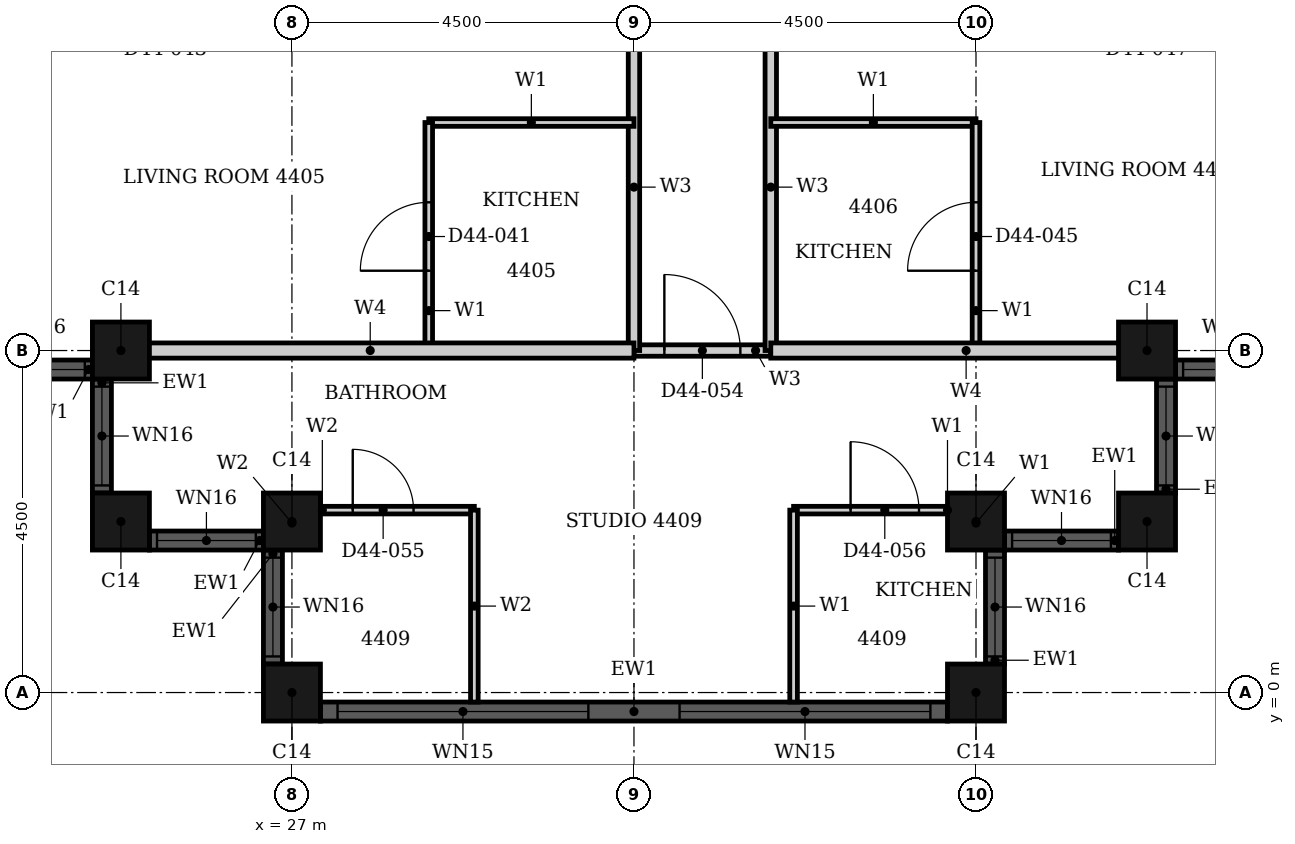
"""IFC4 building model, lengths in metres.
Left out: names, types, materials, properties, quantities, classifications, styles, units other than length and angle.
Written with IfcOpenShell. Run it as: python <this file> out.ifc"""

import sys

from ifc_helpers import new_model, si_unit, direction, frame, frame_2d, origin, origin_2d, place, context, subcontext, project, spatial, rectangle, hollow_rectangle, extrude, element, fill, save


model = new_model("IFC4")
c1 = context("Model", 3, precision=1e-05, world=origin(), true_north=direction((0.0, 1.0)))
c2 = subcontext(c1, "Body", "Model", "MODEL_VIEW")
j1 = project(units=[si_unit("LENGTHUNIT", "METRE"), si_unit("PLANEANGLEUNIT", "RADIAN")], contexts=[c1])
p1 = place(None, origin())
s1 = spatial("IfcSite", under=j1, at=p1, CompositionType="ELEMENT")
p2 = place(p1, origin())
s2 = spatial("IfcBuilding", under=s1, at=p2, CompositionType="ELEMENT")
p3 = place(p2, frame((0.0, 0.0, 176.5)))
s3 = spatial("IfcBuildingStorey", under=s2, at=p3, CompositionType="ELEMENT", Elevation=176.5)
for number, where, z_axis, x_axis in (
    (1, (24.75, 4.5, 0.0), (0.0, 0.0, 1.0), (1.0, 0.0, 0.0)),
    (2, (24.75, 2.25, 0.0), (0.0, 0.0, 1.0), (1.0, 0.0, 0.0)),
    (3, (27.0, 2.25, 0.0), (0.0, 0.0, 1.0), (1.0, 0.0, 0.0)),
    (4, (27.0, 0.0, 0.0), (0.0, 0.0, 1.0), (1.0, 0.0, 0.0)),
    (5, (36.0, 0.0, 0.0), (0.0, 0.0, 1.0), (1.0, 0.0, 0.0)),
    (6, (36.0, 2.25, 0.0), (0.0, 0.0, 1.0), (1.0, 0.0, 0.0)),
    (7, (38.25, 2.25, 0.0), (0.0, 0.0, 1.0), (1.0, 0.0, 0.0)),
    (8, (38.25, 4.5, 0.0), (0.0, 0.0, 1.0), (1.0, 0.0, 0.0)),
):
    element("IfcColumn", number, at=place(p3, frame(where, z_axis=z_axis, x_axis=x_axis)), inside=s3, PredefinedType="COLUMN", context=c2, shape_type="SweptSolid", body=[
        extrude(hollow_rectangle(XDim=0.75, YDim=0.75, WallThickness=0.024, at=origin_2d()), origin(), (0.0, 0.0, 1.0), 3.7),
    ])
p4 = place(p3, frame((22.875, 4.25, 0.0), z_axis=(0.0, 0.0, 1.0), x_axis=(1.0, 0.0, 0.0)))
e9 = element("IfcWall", 9, at=p4, inside=s3, PredefinedType="SOLIDWALL", context=c2, shape_type="SweptSolid", body=[
    extrude(rectangle(XDim=1.5, YDim=0.25, at=frame_2d((0.75, 0.0))), origin(), (0.0, 0.0, 1.0), 3.7),
])
p5 = place(p4, frame((0.1, 0.0, 0.9)))
e10 = element("IfcOpeningElement", 10, at=p5, cuts=e9, PredefinedType="OPENING", context=c2, shape_type="SweptSolid", body=[
    extrude(rectangle(XDim=1.3, YDim=1.85, at=frame_2d((0.65, 0.925))), frame((0.0, 0.135, 0.0), z_axis=(0.0, -1.0, 0.0), x_axis=(1.0, 0.0, 0.0)), (0.0, 0.0, 1.0), 0.27),
])
p6 = place(p3, frame((24.5, 4.125, 0.0), z_axis=(0.0, 0.0, 1.0), x_axis=(0.0, -1.0, 0.0)))
e11 = element("IfcWall", 11, at=p6, inside=s3, PredefinedType="SOLIDWALL", context=c2, shape_type="SweptSolid", body=[
    extrude(rectangle(XDim=1.5, YDim=0.25, at=frame_2d((0.75, 0.0))), origin(), (0.0, 0.0, 1.0), 3.7),
])
p7 = place(p6, frame((0.1, 0.0, 0.9)))
e12 = element("IfcOpeningElement", 12, at=p7, cuts=e11, PredefinedType="OPENING", context=c2, shape_type="SweptSolid", body=[
    extrude(rectangle(XDim=1.3, YDim=1.85, at=frame_2d((0.65, 0.925))), frame((0.0, 0.135, 0.0), z_axis=(0.0, -1.0, 0.0), x_axis=(1.0, 0.0, 0.0)), (0.0, 0.0, 1.0), 0.27),
])
p8 = place(p3, frame((25.125, 2.0, 0.0), z_axis=(0.0, 0.0, 1.0), x_axis=(1.0, 0.0, 0.0)))
e13 = element("IfcWall", 13, at=p8, inside=s3, PredefinedType="SOLIDWALL", context=c2, shape_type="SweptSolid", body=[
    extrude(rectangle(XDim=1.5, YDim=0.25, at=frame_2d((0.75, 0.0))), origin(), (0.0, 0.0, 1.0), 3.7),
])
p9 = place(p8, frame((0.1, 0.0, 0.9)))
e14 = element("IfcOpeningElement", 14, at=p9, cuts=e13, PredefinedType="OPENING", context=c2, shape_type="SweptSolid", body=[
    extrude(rectangle(XDim=1.3, YDim=1.85, at=frame_2d((0.65, 0.925))), frame((0.0, 0.135, 0.0), z_axis=(0.0, -1.0, 0.0), x_axis=(1.0, 0.0, 0.0)), (0.0, 0.0, 1.0), 0.27),
])
p10 = place(p3, frame((26.75, 1.875, 0.0), z_axis=(0.0, 0.0, 1.0), x_axis=(0.0, -1.0, 0.0)))
e15 = element("IfcWall", 15, at=p10, inside=s3, PredefinedType="SOLIDWALL", context=c2, shape_type="SweptSolid", body=[
    extrude(rectangle(XDim=1.5, YDim=0.25, at=frame_2d((0.75, 0.0))), origin(), (0.0, 0.0, 1.0), 3.7),
])
p11 = place(p10, frame((0.1, 0.0, 0.9)))
e16 = element("IfcOpeningElement", 16, at=p11, cuts=e15, PredefinedType="OPENING", context=c2, shape_type="SweptSolid", body=[
    extrude(rectangle(XDim=1.3, YDim=1.85, at=frame_2d((0.65, 0.925))), frame((0.0, 0.135, 0.0), z_axis=(0.0, -1.0, 0.0), x_axis=(1.0, 0.0, 0.0)), (0.0, 0.0, 1.0), 0.27),
])
p12 = place(p3, frame((27.375, -0.25, 0.0), z_axis=(0.0, 0.0, 1.0), x_axis=(1.0, 0.0, 0.0)))
e17 = element("IfcWall", 17, at=p12, inside=s3, PredefinedType="SOLIDWALL", context=c2, shape_type="SweptSolid", body=[
    extrude(rectangle(XDim=8.25, YDim=0.25, at=frame_2d((4.125, 0.0))), origin(), (0.0, 0.0, 1.0), 3.7),
])
p13 = place(p12, frame((0.225, 0.0, 0.45)))
e18 = element("IfcOpeningElement", 18, at=p13, cuts=e17, PredefinedType="OPENING", context=c2, shape_type="SweptSolid", body=[
    extrude(rectangle(XDim=3.3, YDim=2.3, at=frame_2d((1.65, 1.15))), frame((0.0, 0.135, 0.0), z_axis=(0.0, -1.0, 0.0), x_axis=(1.0, 0.0, 0.0)), (0.0, 0.0, 1.0), 0.27),
])
p14 = place(p12, frame((4.725, 0.0, 0.45)))
e19 = element("IfcOpeningElement", 19, at=p14, cuts=e17, PredefinedType="OPENING", context=c2, shape_type="SweptSolid", body=[
    extrude(rectangle(XDim=3.3, YDim=2.3, at=frame_2d((1.65, 1.15))), frame((0.0, 0.135, 0.0), z_axis=(0.0, -1.0, 0.0), x_axis=(1.0, 0.0, 0.0)), (0.0, 0.0, 1.0), 0.27),
])
p15 = place(p3, frame((36.25, 0.375, 0.0), z_axis=(0.0, 0.0, 1.0), x_axis=(0.0, 1.0, 0.0)))
e20 = element("IfcWall", 20, at=p15, inside=s3, PredefinedType="SOLIDWALL", context=c2, shape_type="SweptSolid", body=[
    extrude(rectangle(XDim=1.5, YDim=0.25, at=frame_2d((0.75, 0.0))), origin(), (0.0, 0.0, 1.0), 3.7),
])
p16 = place(p15, frame((0.1, 0.0, 0.9)))
e21 = element("IfcOpeningElement", 21, at=p16, cuts=e20, PredefinedType="OPENING", context=c2, shape_type="SweptSolid", body=[
    extrude(rectangle(XDim=1.3, YDim=1.85, at=frame_2d((0.65, 0.925))), frame((0.0, 0.135, 0.0), z_axis=(0.0, -1.0, 0.0), x_axis=(1.0, 0.0, 0.0)), (0.0, 0.0, 1.0), 0.27),
])
p17 = place(p3, frame((36.375, 2.0, 0.0), z_axis=(0.0, 0.0, 1.0), x_axis=(1.0, 0.0, 0.0)))
e22 = element("IfcWall", 22, at=p17, inside=s3, PredefinedType="SOLIDWALL", context=c2, shape_type="SweptSolid", body=[
    extrude(rectangle(XDim=1.5, YDim=0.25, at=frame_2d((0.75, 0.0))), origin(), (0.0, 0.0, 1.0), 3.7),
])
p18 = place(p17, frame((0.1, 0.0, 0.9)))
e23 = element("IfcOpeningElement", 23, at=p18, cuts=e22, PredefinedType="OPENING", context=c2, shape_type="SweptSolid", body=[
    extrude(rectangle(XDim=1.3, YDim=1.85, at=frame_2d((0.65, 0.925))), frame((0.0, 0.135, 0.0), z_axis=(0.0, -1.0, 0.0), x_axis=(1.0, 0.0, 0.0)), (0.0, 0.0, 1.0), 0.27),
])
p19 = place(p3, frame((38.5, 2.625, 0.0), z_axis=(0.0, 0.0, 1.0), x_axis=(0.0, 1.0, 0.0)))
e24 = element("IfcWall", 24, at=p19, inside=s3, PredefinedType="SOLIDWALL", context=c2, shape_type="SweptSolid", body=[
    extrude(rectangle(XDim=1.5, YDim=0.25, at=frame_2d((0.75, 0.0))), origin(), (0.0, 0.0, 1.0), 3.7),
])
p20 = place(p19, frame((0.1, 0.0, 0.9)))
e25 = element("IfcOpeningElement", 25, at=p20, cuts=e24, PredefinedType="OPENING", context=c2, shape_type="SweptSolid", body=[
    extrude(rectangle(XDim=1.3, YDim=1.85, at=frame_2d((0.65, 0.925))), frame((0.0, 0.135, 0.0), z_axis=(0.0, -1.0, 0.0), x_axis=(1.0, 0.0, 0.0)), (0.0, 0.0, 1.0), 0.27),
])
p21 = place(p3, frame((38.625, 4.25, 0.0), z_axis=(0.0, 0.0, 1.0), x_axis=(1.0, 0.0, 0.0)))
e26 = element("IfcWall", 26, at=p21, inside=s3, PredefinedType="SOLIDWALL", context=c2, shape_type="SweptSolid", body=[
    extrude(rectangle(XDim=1.5, YDim=0.25, at=frame_2d((0.75, 0.0))), origin(), (0.0, 0.0, 1.0), 3.7),
])
p22 = place(p21, frame((0.1, 0.0, 0.9)))
e27 = element("IfcOpeningElement", 27, at=p22, cuts=e26, PredefinedType="OPENING", context=c2, shape_type="SweptSolid", body=[
    extrude(rectangle(XDim=1.3, YDim=1.85, at=frame_2d((0.65, 0.925))), frame((0.0, 0.135, 0.0), z_axis=(0.0, -1.0, 0.0), x_axis=(1.0, 0.0, 0.0)), (0.0, 0.0, 1.0), 0.27),
])
p23 = place(p3, frame((31.5, 4.5, 0.0), z_axis=(0.0, 0.0, 1.0), x_axis=(1.0, 0.0, 0.0)))
e28 = element("IfcWall", 28, at=p23, inside=s3, PredefinedType="PARTITIONING", context=c2, shape_type="SweptSolid", body=[
    extrude(rectangle(XDim=1.8, YDim=0.15, at=frame_2d((0.9, 0.0))), origin(), (0.0, 0.0, 1.0), 3.4),
])
p24 = place(p23, frame((0.4, 0.0, 0.0)))
e29 = element("IfcOpeningElement", 29, at=p24, cuts=e28, PredefinedType="OPENING", context=c2, shape_type="SweptSolid", body=[
    extrude(rectangle(XDim=1.0, YDim=2.2, at=frame_2d((0.5, 1.1))), frame((0.0, 0.085, 0.0), z_axis=(0.0, -1.0, 0.0), x_axis=(1.0, 0.0, 0.0)), (0.0, 0.0, 1.0), 0.17),
])
p25 = place(p3, frame((31.5, 4.5, 0.0), z_axis=(0.0, 0.0, 1.0), x_axis=(0.0, 1.0, 0.0)))
e30 = element("IfcWall", 30, at=p25, inside=s3, PredefinedType="PARTITIONING", context=c2, shape_type="SweptSolid", body=[
    extrude(rectangle(XDim=6.6, YDim=0.15, at=frame_2d((3.3, 0.0))), origin(), (0.0, 0.0, 1.0), 2.68),
])
p26 = place(p25, frame((4.3, 0.0, 0.0)))
e31 = element("IfcOpeningElement", 31, at=p26, cuts=e30, PredefinedType="OPENING", context=c2, shape_type="SweptSolid", body=[
    extrude(rectangle(XDim=1.0, YDim=2.2, at=frame_2d((0.5, 1.1))), frame((0.0, 0.085, 0.0), z_axis=(0.0, -1.0, 0.0), x_axis=(1.0, 0.0, 0.0)), (0.0, 0.0, 1.0), 0.17),
])
p27 = place(p3, frame((33.3, 4.5, 0.0), z_axis=(0.0, 0.0, 1.0), x_axis=(0.0, 1.0, 0.0)))
e32 = element("IfcWall", 32, at=p27, inside=s3, PredefinedType="PARTITIONING", context=c2, shape_type="SweptSolid", body=[
    extrude(rectangle(XDim=6.6, YDim=0.15, at=frame_2d((3.3, 0.0))), origin(), (0.0, 0.0, 1.0), 3.4),
])
p28 = place(p27, frame((4.3, 0.0, 0.0)))
e33 = element("IfcOpeningElement", 33, at=p28, cuts=e32, PredefinedType="OPENING", context=c2, shape_type="SweptSolid", body=[
    extrude(rectangle(XDim=1.0, YDim=2.2, at=frame_2d((0.5, 1.1))), frame((0.0, 0.085, 0.0), z_axis=(0.0, -1.0, 0.0), x_axis=(1.0, 0.0, 0.0)), (0.0, 0.0, 1.0), 0.17),
])
p29 = place(p3, frame((33.6, 2.4, 0.0), z_axis=(0.0, 0.0, 1.0), x_axis=(1.0, 0.0, 0.0)))
e34 = element("IfcWall", 34, at=p29, inside=s3, PredefinedType="PARTITIONING", context=c2, shape_type="SweptSolid", body=[
    extrude(rectangle(XDim=2.4, YDim=0.1, at=frame_2d((1.2, 0.0))), origin(), (0.0, 0.0, 1.0), 3.4),
])
p30 = place(p29, frame((0.75, 0.0, 0.0)))
e35 = element("IfcOpeningElement", 35, at=p30, cuts=e34, PredefinedType="OPENING", context=c2, shape_type="SweptSolid", body=[
    extrude(rectangle(XDim=0.9, YDim=2.1, at=frame_2d((0.45, 1.05))), frame((0.0, 0.06, 0.0), z_axis=(0.0, -1.0, 0.0), x_axis=(1.0, 0.0, 0.0)), (0.0, 0.0, 1.0), 0.12),
])
for number, where, z_axis, x_axis in (
    (36, (33.3, 7.5, 0.0), (0.0, 0.0, 1.0), (1.0, 0.0, 0.0)),
    (37, (28.8, 7.5, 0.0), (0.0, 0.0, 1.0), (1.0, 0.0, 0.0)),
):
    element("IfcWall", number, at=place(p3, frame(where, z_axis=z_axis, x_axis=x_axis)), inside=s3, PredefinedType="PARTITIONING", context=c2, shape_type="SweptSolid", body=[
        extrude(rectangle(XDim=2.7, YDim=0.1, at=frame_2d((1.35, 0.0))), origin(), (0.0, 0.0, 1.0), 3.4),
    ])
p31 = place(p3, frame((28.8, 4.5, 0.0), z_axis=(0.0, 0.0, 1.0), x_axis=(0.0, 1.0, 0.0)))
e38 = element("IfcWall", 38, at=p31, inside=s3, PredefinedType="PARTITIONING", context=c2, shape_type="SweptSolid", body=[
    extrude(rectangle(XDim=3.0, YDim=0.1, at=frame_2d((1.5, 0.0))), origin(), (0.0, 0.0, 1.0), 3.4),
])
p32 = place(p31, frame((1.05, 0.0, 0.0)))
e39 = element("IfcOpeningElement", 39, at=p32, cuts=e38, PredefinedType="OPENING", context=c2, shape_type="SweptSolid", body=[
    extrude(rectangle(XDim=0.9, YDim=2.1, at=frame_2d((0.45, 1.05))), frame((0.0, 0.06, 0.0), z_axis=(0.0, -1.0, 0.0), x_axis=(1.0, 0.0, 0.0)), (0.0, 0.0, 1.0), 0.12),
])
p33 = place(p3, frame((33.6, -0.125, 0.0), z_axis=(0.0, 0.0, 1.0), x_axis=(0.0, 1.0, 0.0)))
e40 = element("IfcWall", 40, at=p33, inside=s3, PredefinedType="PARTITIONING", context=c2, shape_type="SweptSolid", body=[
    extrude(rectangle(XDim=2.525, YDim=0.1, at=frame_2d((1.262, 0.0))), origin(), (0.0, 0.0, 1.0), 3.4),
])
p34 = place(p3, frame((36.0, 4.5, 0.0), z_axis=(0.0, 0.0, 1.0), x_axis=(0.0, 1.0, 0.0)))
e41 = element("IfcWall", 41, at=p34, inside=s3, PredefinedType="PARTITIONING", context=c2, shape_type="SweptSolid", body=[
    extrude(rectangle(XDim=3.0, YDim=0.1, at=frame_2d((1.5, 0.0))), origin(), (0.0, 0.0, 1.0), 2.68),
])
p35 = place(p34, frame((1.05, 0.0, 0.0)))
e42 = element("IfcOpeningElement", 42, at=p35, cuts=e41, PredefinedType="OPENING", context=c2, shape_type="SweptSolid", body=[
    extrude(rectangle(XDim=0.9, YDim=2.1, at=frame_2d((0.45, 1.05))), frame((0.0, 0.06, 0.0), z_axis=(0.0, -1.0, 0.0), x_axis=(1.0, 0.0, 0.0)), (0.0, 0.0, 1.0), 0.12),
])
p36 = place(p3, frame((36.0, 2.06, 0.0), z_axis=(0.0, 0.0, 1.0), x_axis=(0.0, 1.0, 0.0)))
e43 = element("IfcWall", 43, at=p36, inside=s3, PredefinedType="PARTITIONING", context=c2, shape_type="SweptSolid", body=[
    extrude(rectangle(XDim=0.34, YDim=0.1, at=frame_2d((0.17, 0.0))), origin(), (0.0, 0.0, 1.0), 3.4),
])
p37 = place(p3, frame((33.3, 4.5, 0.0), z_axis=(0.0, 0.0, 1.0), x_axis=(1.0, 0.0, 0.0)))
e44 = element("IfcWall", 44, at=p37, inside=s3, PredefinedType="PARTITIONING", context=c2, shape_type="SweptSolid", body=[
    extrude(rectangle(XDim=5.14, YDim=0.2, at=frame_2d((2.57, 0.0))), origin(), (0.0, 0.0, 1.0), 3.4),
])
p38 = place(p3, frame((24.56, 4.5, 0.0), z_axis=(0.0, 0.0, 1.0), x_axis=(1.0, 0.0, 0.0)))
e45 = element("IfcWall", 45, at=p38, inside=s3, PredefinedType="PARTITIONING", context=c2, shape_type="SweptSolid", body=[
    extrude(rectangle(XDim=6.94, YDim=0.2, at=frame_2d((3.47, 0.0))), origin(), (0.0, 0.0, 1.0), 3.4),
])
p39 = place(p3, frame((27.0, 2.4, 0.0), z_axis=(0.0, 0.0, 1.0), x_axis=(1.0, 0.0, 0.0)))
e46 = element("IfcWall", 46, at=p39, inside=s3, PredefinedType="PARTITIONING", context=c2, shape_type="SweptSolid", body=[
    extrude(rectangle(XDim=2.4, YDim=0.1, at=frame_2d((1.2, 0.0))), origin(), (0.0, 0.0, 1.0), 3.4),
])
p40 = place(p39, frame((0.8, 0.0, 0.0)))
e47 = element("IfcOpeningElement", 47, at=p40, cuts=e46, PredefinedType="OPENING", context=c2, shape_type="SweptSolid", body=[
    extrude(rectangle(XDim=0.8, YDim=2.1, at=frame_2d((0.4, 1.05))), frame((0.0, 0.06, 0.0), z_axis=(0.0, -1.0, 0.0), x_axis=(1.0, 0.0, 0.0)), (0.0, 0.0, 1.0), 0.12),
])
p41 = place(p3, frame((27.0, 2.06, 0.0), z_axis=(0.0, 0.0, 1.0), x_axis=(0.0, 1.0, 0.0)))
e48 = element("IfcWall", 48, at=p41, inside=s3, PredefinedType="PARTITIONING", context=c2, shape_type="SweptSolid", body=[
    extrude(rectangle(XDim=0.34, YDim=0.1, at=frame_2d((0.17, 0.0))), origin(), (0.0, 0.0, 1.0), 3.4),
])
p42 = place(p3, frame((29.4, -0.125, 0.0), z_axis=(0.0, 0.0, 1.0), x_axis=(0.0, 1.0, 0.0)))
e49 = element("IfcWall", 49, at=p42, inside=s3, PredefinedType="PARTITIONING", context=c2, shape_type="SweptSolid", body=[
    extrude(rectangle(XDim=2.525, YDim=0.1, at=frame_2d((1.262, 0.0))), origin(), (0.0, 0.0, 1.0), 3.4),
])
p43 = place(p5, origin())
e50 = element("IfcWindow", 50, at=p43, inside=s3, PartitioningType="SINGLE_PANEL", PredefinedType="WINDOW", context=c2, shape_type="SweptSolid", body=[
    extrude(rectangle(XDim=1.3, YDim=1.85, at=frame_2d((0.65, 0.925))), frame((0.0, 0.03, 0.0), z_axis=(0.0, -1.0, 0.0), x_axis=(1.0, 0.0, 0.0)), (0.0, 0.0, 1.0), 0.06),
])
fill(e10, e50)
p44 = place(p7, origin())
e51 = element("IfcWindow", 51, at=p44, inside=s3, PartitioningType="SINGLE_PANEL", PredefinedType="WINDOW", context=c2, shape_type="SweptSolid", body=[
    extrude(rectangle(XDim=1.3, YDim=1.85, at=frame_2d((0.65, 0.925))), frame((0.0, 0.03, 0.0), z_axis=(0.0, -1.0, 0.0), x_axis=(1.0, 0.0, 0.0)), (0.0, 0.0, 1.0), 0.06),
])
fill(e12, e51)
p45 = place(p9, origin())
e52 = element("IfcWindow", 52, at=p45, inside=s3, PartitioningType="SINGLE_PANEL", PredefinedType="WINDOW", context=c2, shape_type="SweptSolid", body=[
    extrude(rectangle(XDim=1.3, YDim=1.85, at=frame_2d((0.65, 0.925))), frame((0.0, 0.03, 0.0), z_axis=(0.0, -1.0, 0.0), x_axis=(1.0, 0.0, 0.0)), (0.0, 0.0, 1.0), 0.06),
])
fill(e14, e52)
p46 = place(p11, origin())
e53 = element("IfcWindow", 53, at=p46, inside=s3, PartitioningType="SINGLE_PANEL", PredefinedType="WINDOW", context=c2, shape_type="SweptSolid", body=[
    extrude(rectangle(XDim=1.3, YDim=1.85, at=frame_2d((0.65, 0.925))), frame((0.0, 0.03, 0.0), z_axis=(0.0, -1.0, 0.0), x_axis=(1.0, 0.0, 0.0)), (0.0, 0.0, 1.0), 0.06),
])
fill(e16, e53)
p47 = place(p13, origin())
e54 = element("IfcWindow", 54, at=p47, inside=s3, PartitioningType="SINGLE_PANEL", PredefinedType="WINDOW", context=c2, shape_type="SweptSolid", body=[
    extrude(rectangle(XDim=3.3, YDim=2.3, at=frame_2d((1.65, 1.15))), frame((0.0, 0.03, 0.0), z_axis=(0.0, -1.0, 0.0), x_axis=(1.0, 0.0, 0.0)), (0.0, 0.0, 1.0), 0.06),
])
fill(e18, e54)
p48 = place(p14, origin())
e55 = element("IfcWindow", 55, at=p48, inside=s3, PartitioningType="SINGLE_PANEL", PredefinedType="WINDOW", context=c2, shape_type="SweptSolid", body=[
    extrude(rectangle(XDim=3.3, YDim=2.3, at=frame_2d((1.65, 1.15))), frame((0.0, 0.03, 0.0), z_axis=(0.0, -1.0, 0.0), x_axis=(1.0, 0.0, 0.0)), (0.0, 0.0, 1.0), 0.06),
])
fill(e19, e55)
p49 = place(p16, origin())
e56 = element("IfcWindow", 56, at=p49, inside=s3, PartitioningType="SINGLE_PANEL", PredefinedType="WINDOW", context=c2, shape_type="SweptSolid", body=[
    extrude(rectangle(XDim=1.3, YDim=1.85, at=frame_2d((0.65, 0.925))), frame((0.0, 0.03, 0.0), z_axis=(0.0, -1.0, 0.0), x_axis=(1.0, 0.0, 0.0)), (0.0, 0.0, 1.0), 0.06),
])
fill(e21, e56)
p50 = place(p18, origin())
e57 = element("IfcWindow", 57, at=p50, inside=s3, PartitioningType="SINGLE_PANEL", PredefinedType="WINDOW", context=c2, shape_type="SweptSolid", body=[
    extrude(rectangle(XDim=1.3, YDim=1.85, at=frame_2d((0.65, 0.925))), frame((0.0, 0.03, 0.0), z_axis=(0.0, -1.0, 0.0), x_axis=(1.0, 0.0, 0.0)), (0.0, 0.0, 1.0), 0.06),
])
fill(e23, e57)
p51 = place(p20, origin())
e58 = element("IfcWindow", 58, at=p51, inside=s3, PartitioningType="SINGLE_PANEL", PredefinedType="WINDOW", context=c2, shape_type="SweptSolid", body=[
    extrude(rectangle(XDim=1.3, YDim=1.85, at=frame_2d((0.65, 0.925))), frame((0.0, 0.03, 0.0), z_axis=(0.0, -1.0, 0.0), x_axis=(1.0, 0.0, 0.0)), (0.0, 0.0, 1.0), 0.06),
])
fill(e25, e58)
p52 = place(p22, origin())
e59 = element("IfcWindow", 59, at=p52, inside=s3, PartitioningType="SINGLE_PANEL", PredefinedType="WINDOW", context=c2, shape_type="SweptSolid", body=[
    extrude(rectangle(XDim=1.3, YDim=1.85, at=frame_2d((0.65, 0.925))), frame((0.0, 0.03, 0.0), z_axis=(0.0, -1.0, 0.0), x_axis=(1.0, 0.0, 0.0)), (0.0, 0.0, 1.0), 0.06),
])
fill(e27, e59)
p53 = place(p32, origin())
e60 = element("IfcDoor", 60, at=p53, inside=s3, OperationType="SINGLE_SWING_LEFT", PredefinedType="DOOR", context=c2, shape_type="SweptSolid", body=[
    extrude(rectangle(XDim=0.9, YDim=2.1, at=frame_2d((0.45, 1.05))), frame((0.0, 0.025, 0.0), z_axis=(0.0, -1.0, 0.0), x_axis=(1.0, 0.0, 0.0)), (0.0, 0.0, 1.0), 0.05),
])
fill(e39, e60)
p54 = place(p35, origin())
e61 = element("IfcDoor", 61, at=p54, inside=s3, OperationType="SINGLE_SWING_LEFT", PredefinedType="DOOR", context=c2, shape_type="SweptSolid", body=[
    extrude(rectangle(XDim=0.9, YDim=2.1, at=frame_2d((0.45, 1.05))), frame((0.0, 0.025, 0.0), z_axis=(0.0, -1.0, 0.0), x_axis=(1.0, 0.0, 0.0)), (0.0, 0.0, 1.0), 0.05),
])
fill(e42, e61)
p55 = place(p24, origin())
e62 = element("IfcDoor", 62, at=p55, inside=s3, OperationType="SINGLE_SWING_RIGHT", PredefinedType="DOOR", context=c2, shape_type="SweptSolid", body=[
    extrude(rectangle(XDim=1.0, YDim=2.2, at=frame_2d((0.5, 1.1))), frame((0.0, 0.025, 0.0), z_axis=(0.0, -1.0, 0.0), x_axis=(1.0, 0.0, 0.0)), (0.0, 0.0, 1.0), 0.05),
])
fill(e29, e62)
p56 = place(p40, origin())
e63 = element("IfcDoor", 63, at=p56, inside=s3, OperationType="SINGLE_SWING_LEFT", PredefinedType="DOOR", context=c2, shape_type="SweptSolid", body=[
    extrude(rectangle(XDim=0.8, YDim=2.1, at=frame_2d((0.4, 1.05))), frame((0.0, 0.025, 0.0), z_axis=(0.0, -1.0, 0.0), x_axis=(1.0, 0.0, 0.0)), (0.0, 0.0, 1.0), 0.05),
])
fill(e47, e63)
p57 = place(p30, origin())
e64 = element("IfcDoor", 64, at=p57, inside=s3, OperationType="SINGLE_SWING_RIGHT", PredefinedType="DOOR", context=c2, shape_type="SweptSolid", body=[
    extrude(rectangle(XDim=0.9, YDim=2.1, at=frame_2d((0.45, 1.05))), frame((0.0, 0.025, 0.0), z_axis=(0.0, -1.0, 0.0), x_axis=(1.0, 0.0, 0.0)), (0.0, 0.0, 1.0), 0.05),
])
fill(e35, e64)
save(model, sys.argv[1])
